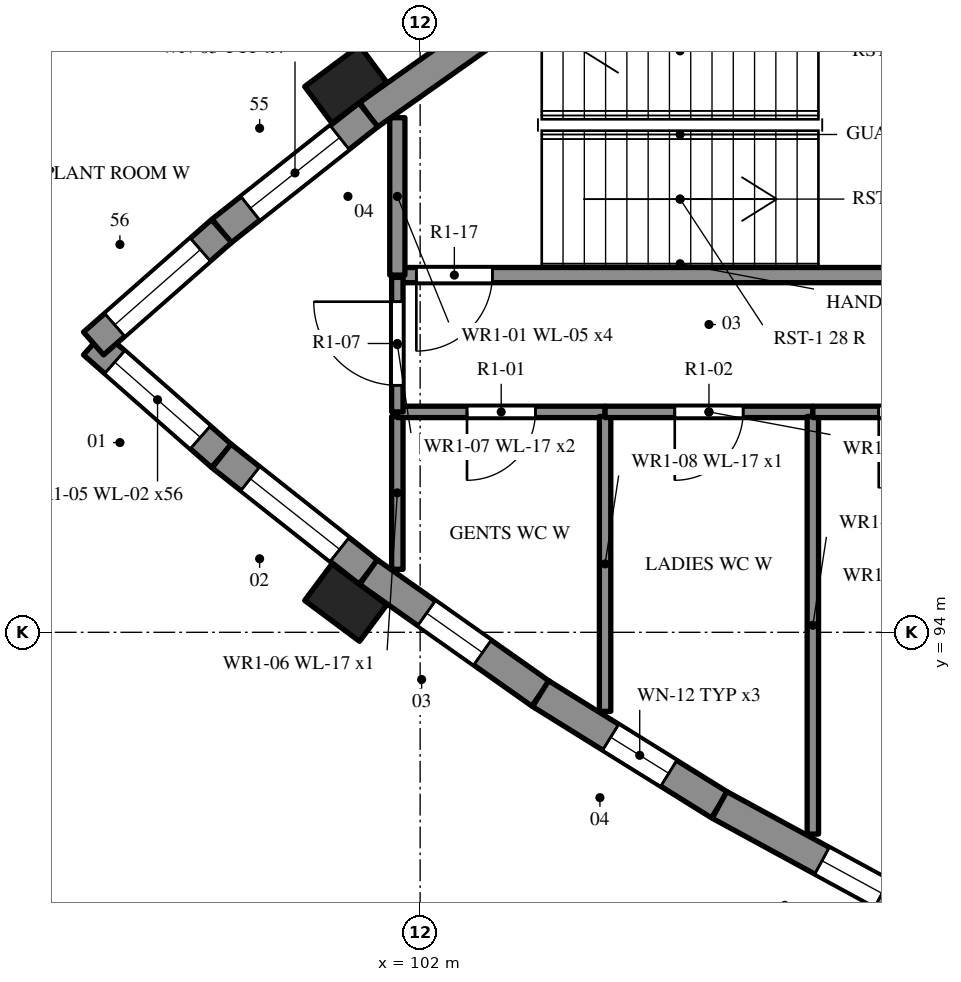
"""IFC4 building model, lengths in metres.
Left out: names, types, materials, properties, quantities, classifications, styles, units other than length and angle.
Written with IfcOpenShell. Run it as: python <this file> out.ifc"""

import sys

from ifc_helpers import new_model, si_unit, direction, frame, frame_2d, origin, origin_2d, place, context, subcontext, project, spatial, rectangle, extrude, element, fill, save


model = new_model("IFC4")
c1 = context("Model", 3, precision=1e-05, world=origin(), true_north=direction((0.0, 1.0)))
c2 = subcontext(c1, "Body", "Model", "MODEL_VIEW")
j1 = project(units=[si_unit("LENGTHUNIT", "METRE"), si_unit("PLANEANGLEUNIT", "RADIAN")], contexts=[c1])
p1 = place(None, origin())
s1 = spatial("IfcSite", under=j1, at=p1, CompositionType="ELEMENT")
p2 = place(p1, origin())
s2 = spatial("IfcBuilding", under=s1, at=p2, CompositionType="ELEMENT")
p3 = place(p2, frame((0.0, 0.0, 5.4)))
s3 = spatial("IfcBuildingStorey", under=s2, at=p3, CompositionType="ELEMENT", Elevation=5.4)
p4 = place(p3, frame((109.9, 98.7, 0.0), z_axis=(0.0, 0.0, 1.0), x_axis=(-1.0, 0.0, 0.0)))
e1 = element("IfcWall", 1, at=p4, inside=s3, PredefinedType="SHEAR", context=c2, shape_type="SweptSolid", body=[
    extrude(rectangle(XDim=8.2, YDim=0.2, at=frame_2d((4.1, 0.0))), origin(), (0.0, 0.0, 1.0), 4.8),
])
p5 = place(p4, frame((6.95, 0.0, 0.0)))
e2 = element("IfcOpeningElement", 2, at=p5, cuts=e1, PredefinedType="OPENING", context=c2, shape_type="SweptSolid", body=[
    extrude(rectangle(XDim=1.0, YDim=2.4, at=frame_2d((0.5, 1.2))), frame((0.0, 0.11, 0.0), z_axis=(0.0, -1.0, 0.0), x_axis=(1.0, 0.0, 0.0)), (0.0, 0.0, 1.0), 0.22),
])
p6 = place(p3, frame((101.7, 98.7, 0.0), z_axis=(0.0, 0.0, 1.0), x_axis=(0.0, 1.0, 0.0)))
e3 = element("IfcWall", 3, at=p6, inside=s3, PredefinedType="SHEAR", context=c2, shape_type="SweptSolid", body=[
    extrude(rectangle(XDim=2.071, YDim=0.2, at=frame_2d((1.035, 0.0))), origin(), (0.0, 0.0, 1.0), 4.8),
])
p7 = place(p3, frame((97.703, 97.8, 0.0), z_axis=(0.0, 0.0, 1.0), x_axis=(0.751212351098, -0.660060605973, 0.0)))
e4 = element("IfcWall", 4, at=p7, inside=s3, PredefinedType="SOLIDWALL", context=c2, shape_type="SweptSolid", body=[
    extrude(rectangle(XDim=2.242, YDim=0.4, at=frame_2d((1.121, 0.0))), origin(), (0.0, 0.0, 1.0), 4.8),
])
p8 = place(p7, frame((0.371, 0.0, 2.4)))
e5 = element("IfcOpeningElement", 5, at=p8, cuts=e4, PredefinedType="OPENING", context=c2, shape_type="SweptSolid", body=[
    extrude(rectangle(XDim=1.5, YDim=0.6, at=frame_2d((0.75, 0.3))), frame((0.0, 0.21, 0.0), z_axis=(0.0, -1.0, 0.0), x_axis=(1.0, 0.0, 0.0)), (0.0, 0.0, 1.0), 0.42),
])
p9 = place(p3, frame((99.387, 96.32, 0.0), z_axis=(0.0, 0.0, 1.0), x_axis=(0.784278812541, -0.620408530082, 0.0)))
e6 = element("IfcWall", 6, at=p9, inside=s3, PredefinedType="SOLIDWALL", context=c2, shape_type="SweptSolid", body=[
    extrude(rectangle(XDim=2.464, YDim=0.4, at=frame_2d((1.232, 0.0))), origin(), (0.0, 0.0, 1.0), 4.8),
])
p10 = place(p9, frame((0.482, 0.0, 2.4)))
e7 = element("IfcOpeningElement", 7, at=p10, cuts=e6, PredefinedType="OPENING", context=c2, shape_type="SweptSolid", body=[
    extrude(rectangle(XDim=1.5, YDim=0.6, at=frame_2d((0.75, 0.3))), frame((0.0, 0.21, 0.0), z_axis=(0.0, -1.0, 0.0), x_axis=(1.0, 0.0, 0.0)), (0.0, 0.0, 1.0), 0.42),
])
p11 = place(p3, frame((101.32, 94.792, 0.0), z_axis=(0.0, 0.0, 1.0), x_axis=(0.817028877428, -0.576596751161, 0.0)))
e8 = element("IfcWall", 8, at=p11, inside=s3, PredefinedType="SOLIDWALL", context=c2, shape_type="SweptSolid", body=[
    extrude(rectangle(XDim=2.772, YDim=0.4, at=frame_2d((1.386, 0.0))), origin(), (0.0, 0.0, 1.0), 4.8),
])
p12 = place(p11, frame((0.936, 0.0, 1.6)))
e9 = element("IfcOpeningElement", 9, at=p12, cuts=e8, PredefinedType="OPENING", context=c2, shape_type="SweptSolid", body=[
    extrude(rectangle(XDim=0.9, YDim=0.6, at=frame_2d((0.45, 0.3))), frame((0.0, 0.21, 0.0), z_axis=(0.0, -1.0, 0.0), x_axis=(1.0, 0.0, 0.0)), (0.0, 0.0, 1.0), 0.42),
])
p13 = place(p3, frame((103.585, 93.193, 0.0), z_axis=(0.0, 0.0, 1.0), x_axis=(0.84912946359, -0.528184772653, 0.0)))
e10 = element("IfcWall", 10, at=p13, inside=s3, PredefinedType="SOLIDWALL", context=c2, shape_type="SweptSolid", body=[
    extrude(rectangle(XDim=2.772, YDim=0.4, at=frame_2d((1.386, 0.0))), origin(), (0.0, 0.0, 1.0), 4.8),
])
p14 = place(p13, frame((1.086, 0.0, 1.6)))
e11 = element("IfcOpeningElement", 11, at=p14, cuts=e10, PredefinedType="OPENING", context=c2, shape_type="SweptSolid", body=[
    extrude(rectangle(XDim=0.9, YDim=0.6, at=frame_2d((0.45, 0.3))), frame((0.0, 0.21, 0.0), z_axis=(0.0, -1.0, 0.0), x_axis=(1.0, 0.0, 0.0)), (0.0, 0.0, 1.0), 0.42),
])
p15 = place(p3, frame((105.938, 91.729, 0.0), z_axis=(0.0, 0.0, 1.0), x_axis=(0.878292493566, -0.478123724308, 0.0)))
e12 = element("IfcWall", 12, at=p15, inside=s3, PredefinedType="SOLIDWALL", context=c2, shape_type="SweptSolid", body=[
    extrude(rectangle(XDim=2.772, YDim=0.4, at=frame_2d((1.386, 0.0))), origin(), (0.0, 0.0, 1.0), 4.8),
])
p16 = place(p15, frame((1.536, 0.0, 1.6)))
e13 = element("IfcOpeningElement", 13, at=p16, cuts=e12, PredefinedType="OPENING", context=c2, shape_type="SweptSolid", body=[
    extrude(rectangle(XDim=0.9, YDim=0.6, at=frame_2d((0.45, 0.3))), frame((0.0, 0.21, 0.0), z_axis=(0.0, -1.0, 0.0), x_axis=(1.0, 0.0, 0.0)), (0.0, 0.0, 1.0), 0.42),
])
p17 = place(p3, frame((103.585, 102.407, 0.0), z_axis=(0.0, 0.0, 1.0), x_axis=(-0.817070367038, -0.57653795652, 0.0)))
e14 = element("IfcWall", 14, at=p17, inside=s3, PredefinedType="SOLIDWALL", context=c2, shape_type="SweptSolid", body=[
    extrude(rectangle(XDim=2.772, YDim=0.4, at=frame_2d((1.386, 0.0))), origin(), (0.0, 0.0, 1.0), 4.8),
])
p18 = place(p3, frame((101.32, 100.809, 0.0), z_axis=(0.0, 0.0, 1.0), x_axis=(-0.784278812541, -0.620408530082, 0.0)))
e15 = element("IfcWall", 15, at=p18, inside=s3, PredefinedType="SOLIDWALL", context=c2, shape_type="SweptSolid", body=[
    extrude(rectangle(XDim=2.464, YDim=0.4, at=frame_2d((1.232, 0.0))), origin(), (0.0, 0.0, 1.0), 4.8),
])
p19 = place(p18, frame((0.482, 0.0, 2.4)))
e16 = element("IfcOpeningElement", 16, at=p19, cuts=e15, PredefinedType="OPENING", context=c2, shape_type="SweptSolid", body=[
    extrude(rectangle(XDim=1.5, YDim=0.6, at=frame_2d((0.75, 0.3))), frame((0.0, 0.21, 0.0), z_axis=(0.0, -1.0, 0.0), x_axis=(1.0, 0.0, 0.0)), (0.0, 0.0, 1.0), 0.42),
])
p20 = place(p3, frame((99.387, 99.28, 0.0), z_axis=(0.0, 0.0, 1.0), x_axis=(-0.751212351098, -0.660060605973, 0.0)))
e17 = element("IfcWall", 17, at=p20, inside=s3, PredefinedType="SOLIDWALL", context=c2, shape_type="SweptSolid", body=[
    extrude(rectangle(XDim=2.242, YDim=0.4, at=frame_2d((1.121, 0.0))), origin(), (0.0, 0.0, 1.0), 4.8),
])
p21 = place(p20, frame((0.371, 0.0, 2.4)))
e18 = element("IfcOpeningElement", 18, at=p21, cuts=e17, PredefinedType="OPENING", context=c2, shape_type="SweptSolid", body=[
    extrude(rectangle(XDim=1.5, YDim=0.6, at=frame_2d((0.75, 0.3))), frame((0.0, 0.21, 0.0), z_axis=(0.0, -1.0, 0.0), x_axis=(1.0, 0.0, 0.0)), (0.0, 0.0, 1.0), 0.42),
])
for number, where, z_axis, x_axis in (
    (19, (101.021, 94.391, 0.0), (0.0, 0.0, 1.0), (0.802, -0.597, 0.0)),
    (20, (101.021, 101.209, 0.0), (0.0, 0.0, 1.0), (-0.802, -0.597, 0.0)),
):
    element("IfcColumn", number, at=place(p3, frame(where, z_axis=z_axis, x_axis=x_axis)), inside=s3, PredefinedType="PILASTER", context=c2, shape_type="SweptSolid", body=[
        extrude(rectangle(XDim=0.9, YDim=0.6, at=origin_2d()), origin(), (0.0, 0.0, 1.0), 4.8),
    ])
p22 = place(p3, frame((101.7, 94.829, 0.0), z_axis=(0.0, 0.0, 1.0), x_axis=(0.0, 1.0, 0.0)))
e21 = element("IfcWall", 21, at=p22, inside=s3, PredefinedType="PARTITIONING", context=c2, shape_type="SweptSolid", body=[
    extrude(rectangle(XDim=2.011, YDim=0.15, at=frame_2d((1.005, 0.0))), origin(), (0.0, 0.0, 1.0), 4.52),
])
p23 = place(p3, frame((104.433, 96.9, 0.0), z_axis=(0.0, 0.0, 1.0), x_axis=(-1.0, 0.0, 0.0)))
e22 = element("IfcWall", 22, at=p23, inside=s3, PredefinedType="PARTITIONING", context=c2, shape_type="SweptSolid", body=[
    extrude(rectangle(XDim=2.733, YDim=0.15, at=frame_2d((1.367, 0.0))), origin(), (0.0, 0.0, 1.0), 4.52),
])
p24 = place(p23, frame((0.917, 0.0, 0.0)))
e23 = element("IfcOpeningElement", 23, at=p24, cuts=e22, PredefinedType="OPENING", context=c2, shape_type="SweptSolid", body=[
    extrude(rectangle(XDim=0.9, YDim=2.1, at=frame_2d((0.45, 1.05))), frame((0.0, 0.085, 0.0), z_axis=(0.0, -1.0, 0.0), x_axis=(1.0, 0.0, 0.0)), (0.0, 0.0, 1.0), 0.17),
])
p25 = place(p3, frame((101.7, 96.9, 0.0), z_axis=(0.0, 0.0, 1.0), x_axis=(0.0, 1.0, 0.0)))
e24 = element("IfcWall", 24, at=p25, inside=s3, PredefinedType="PARTITIONING", context=c2, shape_type="SweptSolid", body=[
    extrude(rectangle(XDim=1.77, YDim=0.15, at=frame_2d((0.885, 0.0))), origin(), (0.0, 0.0, 1.0), 4.52),
])
p26 = place(p25, frame((0.35, 0.0, 0.0)))
e25 = element("IfcOpeningElement", 25, at=p26, cuts=e24, PredefinedType="OPENING", context=c2, shape_type="SweptSolid", body=[
    extrude(rectangle(XDim=1.1, YDim=2.1, at=frame_2d((0.55, 1.05))), frame((0.0, 0.085, 0.0), z_axis=(0.0, -1.0, 0.0), x_axis=(1.0, 0.0, 0.0)), (0.0, 0.0, 1.0), 0.17),
])
p27 = place(p3, frame((104.433, 96.84, 0.0), z_axis=(0.0, 0.0, 1.0), x_axis=(0.0, -1.0, 0.0)))
e26 = element("IfcWall", 26, at=p27, inside=s3, PredefinedType="PARTITIONING", context=c2, shape_type="SweptSolid", body=[
    extrude(rectangle(XDim=3.88, YDim=0.15, at=frame_2d((1.94, 0.0))), origin(), (0.0, 0.0, 1.0), 4.52),
])
p28 = place(p3, frame((107.167, 96.9, 0.0), z_axis=(0.0, 0.0, 1.0), x_axis=(-1.0, 0.0, 0.0)))
e27 = element("IfcWall", 27, at=p28, inside=s3, PredefinedType="PARTITIONING", context=c2, shape_type="SweptSolid", body=[
    extrude(rectangle(XDim=2.733, YDim=0.15, at=frame_2d((1.367, 0.0))), origin(), (0.0, 0.0, 1.0), 4.52),
])
p29 = place(p28, frame((0.917, 0.0, 0.0)))
e28 = element("IfcOpeningElement", 28, at=p29, cuts=e27, PredefinedType="OPENING", context=c2, shape_type="SweptSolid", body=[
    extrude(rectangle(XDim=0.9, YDim=2.1, at=frame_2d((0.45, 1.05))), frame((0.0, 0.085, 0.0), z_axis=(0.0, -1.0, 0.0), x_axis=(1.0, 0.0, 0.0)), (0.0, 0.0, 1.0), 0.17),
])
p30 = place(p3, frame((107.167, 96.84, 0.0), z_axis=(0.0, 0.0, 1.0), x_axis=(0.0, -1.0, 0.0)))
e29 = element("IfcWall", 29, at=p30, inside=s3, PredefinedType="PARTITIONING", context=c2, shape_type="SweptSolid", body=[
    extrude(rectangle(XDim=5.495, YDim=0.15, at=frame_2d((2.748, 0.0))), origin(), (0.0, 0.0, 1.0), 4.52),
])
p31 = place(p3, frame((109.9, 96.9, 0.0), z_axis=(0.0, 0.0, 1.0), x_axis=(-1.0, 0.0, 0.0)))
e30 = element("IfcWall", 30, at=p31, inside=s3, PredefinedType="PARTITIONING", context=c2, shape_type="SweptSolid", body=[
    extrude(rectangle(XDim=2.733, YDim=0.15, at=frame_2d((1.367, 0.0))), origin(), (0.0, 0.0, 1.0), 4.52),
])
p32 = place(p31, frame((0.867, 0.0, 0.0)))
e31 = element("IfcOpeningElement", 31, at=p32, cuts=e30, PredefinedType="OPENING", context=c2, shape_type="SweptSolid", body=[
    extrude(rectangle(XDim=1.0, YDim=2.1, at=frame_2d((0.5, 1.05))), frame((0.0, 0.085, 0.0), z_axis=(0.0, -1.0, 0.0), x_axis=(1.0, 0.0, 0.0)), (0.0, 0.0, 1.0), 0.17),
])
p33 = place(p8, origin())
e32 = element("IfcWindow", 32, at=p33, inside=s3, PartitioningType="SINGLE_PANEL", PredefinedType="WINDOW", context=c2, shape_type="SweptSolid", body=[
    extrude(rectangle(XDim=1.5, YDim=0.6, at=frame_2d((0.75, 0.3))), frame((0.0, 0.03, 0.0), z_axis=(0.0, -1.0, 0.0), x_axis=(1.0, 0.0, 0.0)), (0.0, 0.0, 1.0), 0.06),
])
fill(e5, e32)
p34 = place(p10, origin())
e33 = element("IfcWindow", 33, at=p34, inside=s3, PartitioningType="SINGLE_PANEL", PredefinedType="WINDOW", context=c2, shape_type="SweptSolid", body=[
    extrude(rectangle(XDim=1.5, YDim=0.6, at=frame_2d((0.75, 0.3))), frame((0.0, 0.03, 0.0), z_axis=(0.0, -1.0, 0.0), x_axis=(1.0, 0.0, 0.0)), (0.0, 0.0, 1.0), 0.06),
])
fill(e7, e33)
p35 = place(p12, origin())
e34 = element("IfcWindow", 34, at=p35, inside=s3, PartitioningType="SINGLE_PANEL", PredefinedType="WINDOW", context=c2, shape_type="SweptSolid", body=[
    extrude(rectangle(XDim=0.9, YDim=0.6, at=frame_2d((0.45, 0.3))), frame((0.0, 0.03, 0.0), z_axis=(0.0, -1.0, 0.0), x_axis=(1.0, 0.0, 0.0)), (0.0, 0.0, 1.0), 0.06),
])
fill(e9, e34)
p36 = place(p14, origin())
e35 = element("IfcWindow", 35, at=p36, inside=s3, PartitioningType="SINGLE_PANEL", PredefinedType="WINDOW", context=c2, shape_type="SweptSolid", body=[
    extrude(rectangle(XDim=0.9, YDim=0.6, at=frame_2d((0.45, 0.3))), frame((0.0, 0.03, 0.0), z_axis=(0.0, -1.0, 0.0), x_axis=(1.0, 0.0, 0.0)), (0.0, 0.0, 1.0), 0.06),
])
fill(e11, e35)
p37 = place(p16, origin())
e36 = element("IfcWindow", 36, at=p37, inside=s3, PartitioningType="SINGLE_PANEL", PredefinedType="WINDOW", context=c2, shape_type="SweptSolid", body=[
    extrude(rectangle(XDim=0.9, YDim=0.6, at=frame_2d((0.45, 0.3))), frame((0.0, 0.03, 0.0), z_axis=(0.0, -1.0, 0.0), x_axis=(1.0, 0.0, 0.0)), (0.0, 0.0, 1.0), 0.06),
])
fill(e13, e36)
p38 = place(p19, origin())
e37 = element("IfcWindow", 37, at=p38, inside=s3, PartitioningType="SINGLE_PANEL", PredefinedType="WINDOW", context=c2, shape_type="SweptSolid", body=[
    extrude(rectangle(XDim=1.5, YDim=0.6, at=frame_2d((0.75, 0.3))), frame((0.0, 0.03, 0.0), z_axis=(0.0, -1.0, 0.0), x_axis=(1.0, 0.0, 0.0)), (0.0, 0.0, 1.0), 0.06),
])
fill(e16, e37)
p39 = place(p21, origin())
e38 = element("IfcWindow", 38, at=p39, inside=s3, PartitioningType="SINGLE_PANEL", PredefinedType="WINDOW", context=c2, shape_type="SweptSolid", body=[
    extrude(rectangle(XDim=1.5, YDim=0.6, at=frame_2d((0.75, 0.3))), frame((0.0, 0.03, 0.0), z_axis=(0.0, -1.0, 0.0), x_axis=(1.0, 0.0, 0.0)), (0.0, 0.0, 1.0), 0.06),
])
fill(e18, e38)
p40 = place(p24, origin())
e39 = element("IfcDoor", 39, at=p40, inside=s3, OperationType="SINGLE_SWING_RIGHT", PredefinedType="DOOR", context=c2, shape_type="SweptSolid", body=[
    extrude(rectangle(XDim=0.9, YDim=2.1, at=frame_2d((0.45, 1.05))), frame((0.0, 0.025, 0.0), z_axis=(0.0, -1.0, 0.0), x_axis=(1.0, 0.0, 0.0)), (0.0, 0.0, 1.0), 0.05),
])
fill(e23, e39)
p41 = place(p29, origin())
e40 = element("IfcDoor", 40, at=p41, inside=s3, OperationType="SINGLE_SWING_RIGHT", PredefinedType="DOOR", context=c2, shape_type="SweptSolid", body=[
    extrude(rectangle(XDim=0.9, YDim=2.1, at=frame_2d((0.45, 1.05))), frame((0.0, 0.025, 0.0), z_axis=(0.0, -1.0, 0.0), x_axis=(1.0, 0.0, 0.0)), (0.0, 0.0, 1.0), 0.05),
])
fill(e28, e40)
p42 = place(p32, origin())
e41 = element("IfcDoor", 41, at=p42, inside=s3, OperationType="SINGLE_SWING_RIGHT", PredefinedType="DOOR", context=c2, shape_type="SweptSolid", body=[
    extrude(rectangle(XDim=1.0, YDim=2.1, at=frame_2d((0.5, 1.05))), frame((0.0, 0.025, 0.0), z_axis=(0.0, -1.0, 0.0), x_axis=(1.0, 0.0, 0.0)), (0.0, 0.0, 1.0), 0.05),
])
fill(e31, e41)
p43 = place(p26, origin())
e42 = element("IfcDoor", 42, at=p43, inside=s3, OperationType="SINGLE_SWING_RIGHT", PredefinedType="DOOR", context=c2, shape_type="SweptSolid", body=[
    extrude(rectangle(XDim=1.1, YDim=2.1, at=frame_2d((0.55, 1.05))), frame((0.0, 0.025, 0.0), z_axis=(0.0, -1.0, 0.0), x_axis=(1.0, 0.0, 0.0)), (0.0, 0.0, 1.0), 0.05),
])
fill(e25, e42)
p44 = place(p5, origin())
e43 = element("IfcDoor", 43, at=p44, inside=s3, OperationType="SINGLE_SWING_RIGHT", PredefinedType="DOOR", context=c2, shape_type="SweptSolid", body=[
    extrude(rectangle(XDim=1.0, YDim=2.4, at=frame_2d((0.5, 1.2))), frame((0.0, 0.025, 0.0), z_axis=(0.0, -1.0, 0.0), x_axis=(1.0, 0.0, 0.0)), (0.0, 0.0, 1.0), 0.05),
])
fill(e2, e43)
save(model, sys.argv[1])
